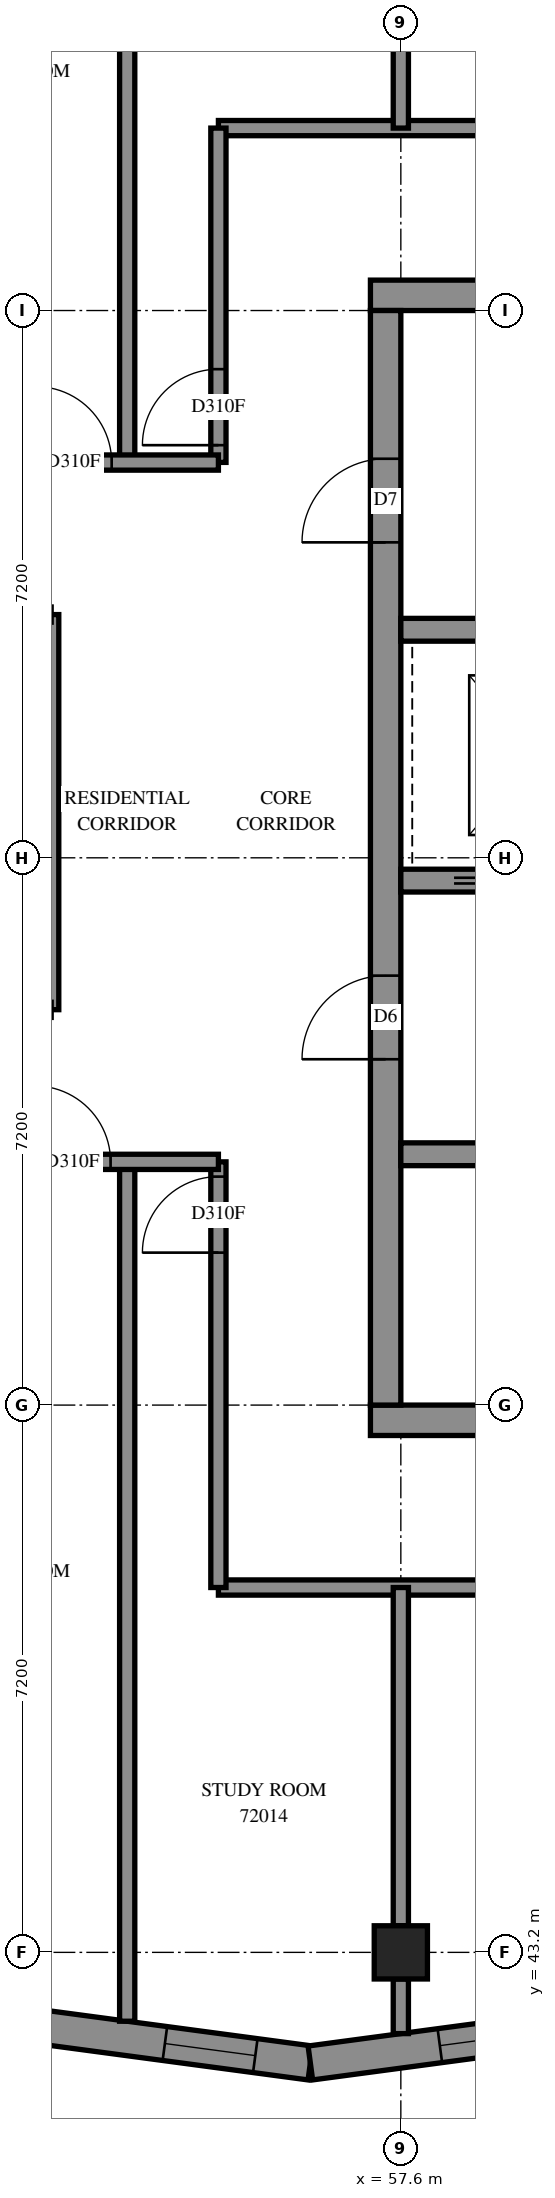
"""IFC4 building model, lengths in metres.
Left out: names, types, materials, properties, quantities, classifications, styles, units other than length and angle.
Written with IfcOpenShell. Run it as: python <this file> out.ifc"""

import sys

from ifc_helpers import new_model, si_unit, direction, frame, frame_2d, origin, origin_2d, place, context, subcontext, project, spatial, polyline, rectangle, outline, extrude, element, fill, save


model = new_model("IFC4")
c1 = context("Model", 3, precision=1e-05, world=origin(), true_north=direction((0.0, 1.0)))
c2 = subcontext(c1, "Body", "Model", "MODEL_VIEW")
j1 = project(units=[si_unit("LENGTHUNIT", "METRE"), si_unit("PLANEANGLEUNIT", "RADIAN")], contexts=[c1])
p1 = place(None, origin())
s1 = spatial("IfcSite", under=j1, at=p1, CompositionType="ELEMENT")
p2 = place(p1, origin())
s2 = spatial("IfcBuilding", under=s1, at=p2, CompositionType="ELEMENT")
p3 = place(p2, frame((0.0, 0.0, 264.2)))
s3 = spatial("IfcBuildingStorey", under=s2, at=p3, CompositionType="ELEMENT", Elevation=264.2)
p4 = place(p3, frame((57.6, 43.2, 0.0), z_axis=(0.0, 0.0, 1.0), x_axis=(1.0, 0.0, 0.0)))
e1 = element("IfcColumn", 1, at=p4, inside=s3, PredefinedType="COLUMN", context=c2, shape_type="SweptSolid", body=[
    extrude(rectangle(XDim=0.7, YDim=0.7, at=origin_2d()), origin(), (0.0, 0.0, 1.0), 3.1),
])
p5 = place(p3, frame((57.2, 50.2, -0.3), z_axis=(0.0, 0.0, 1.0), x_axis=(1.0, 0.0, 0.0)))
e2 = element("IfcWall", 2, at=p5, inside=s3, PredefinedType="SHEAR", context=c2, shape_type="SweptSolid", body=[
    extrude(rectangle(XDim=15.2, YDim=0.4, at=frame_2d((7.6, 0.0))), origin(), (0.0, 0.0, 1.0), 2.7),
])
p6 = place(p3, frame((57.2, 65.0, -0.3), z_axis=(0.0, 0.0, 1.0), x_axis=(1.0, 0.0, 0.0)))
e3 = element("IfcWall", 3, at=p6, inside=s3, PredefinedType="SHEAR", context=c2, shape_type="SweptSolid", body=[
    extrude(rectangle(XDim=15.2, YDim=0.4, at=frame_2d((7.6, 0.0))), origin(), (0.0, 0.0, 1.0), 2.7),
])
p7 = place(p6, frame((10.4, 0.0, 0.3)))
e4 = element("IfcOpeningElement", 4, at=p7, cuts=e3, PredefinedType="OPENING", context=c2, shape_type="SweptSolid", body=[
    extrude(rectangle(XDim=0.8, YDim=2.1, at=frame_2d((0.4, 1.05))), frame((0.0, 0.21, 0.0), z_axis=(0.0, -1.0, 0.0), x_axis=(1.0, 0.0, 0.0)), (0.0, 0.0, 1.0), 0.42),
])
p8 = place(p3, frame((57.4, 50.4, -0.3), z_axis=(0.0, 0.0, 1.0), x_axis=(0.0, 1.0, 0.0)))
e5 = element("IfcWall", 5, at=p8, inside=s3, PredefinedType="SHEAR", context=c2, shape_type="SweptSolid", body=[
    extrude(rectangle(XDim=14.4, YDim=0.4, at=frame_2d((7.2, 0.0))), origin(), (0.0, 0.0, 1.0), 2.7),
])
p9 = place(p8, frame((4.55, 0.0, 0.3)))
e6 = element("IfcOpeningElement", 6, at=p9, cuts=e5, PredefinedType="OPENING", context=c2, shape_type="SweptSolid", body=[
    extrude(rectangle(XDim=1.1, YDim=2.1, at=frame_2d((0.55, 1.05))), frame((0.0, 0.21, 0.0), z_axis=(0.0, -1.0, 0.0), x_axis=(1.0, 0.0, 0.0)), (0.0, 0.0, 1.0), 0.42),
])
p10 = place(p8, frame((11.35, 0.0, 0.3)))
e7 = element("IfcOpeningElement", 7, at=p10, cuts=e5, PredefinedType="OPENING", context=c2, shape_type="SweptSolid", body=[
    extrude(rectangle(XDim=1.1, YDim=2.1, at=frame_2d((0.55, 1.05))), frame((0.0, 0.21, 0.0), z_axis=(0.0, -1.0, 0.0), x_axis=(1.0, 0.0, 0.0)), (0.0, 0.0, 1.0), 0.42),
])
p11 = place(p3, frame((57.6, 53.7, 0.0), z_axis=(0.0, 0.0, 1.0), x_axis=(1.0, 0.0, 0.0)))
e8 = element("IfcWall", 8, at=p11, inside=s3, PredefinedType="SOLIDWALL", context=c2, shape_type="SweptSolid", body=[
    extrude(rectangle(XDim=14.4, YDim=0.3, at=frame_2d((7.2, 0.0))), origin(), (0.0, 0.0, 1.0), 3.1),
])
p12 = place(p11, frame((1.35, 0.0, 0.0)))
e9 = element("IfcOpeningElement", 9, at=p12, cuts=e8, PredefinedType="OPENING", context=c2, shape_type="SweptSolid", body=[
    extrude(rectangle(XDim=0.9, YDim=2.1, at=frame_2d((0.45, 1.05))), frame((0.0, 0.16, 0.0), z_axis=(0.0, -1.0, 0.0), x_axis=(1.0, 0.0, 0.0)), (0.0, 0.0, 1.0), 0.32),
])
p13 = place(p11, frame((4.95, 0.0, 0.0)))
e10 = element("IfcOpeningElement", 10, at=p13, cuts=e8, PredefinedType="OPENING", context=c2, shape_type="SweptSolid", body=[
    extrude(rectangle(XDim=0.9, YDim=2.1, at=frame_2d((0.45, 1.05))), frame((0.0, 0.16, 0.0), z_axis=(0.0, -1.0, 0.0), x_axis=(1.0, 0.0, 0.0)), (0.0, 0.0, 1.0), 0.32),
])
p14 = place(p11, frame((8.55, 0.0, 0.0)))
e11 = element("IfcOpeningElement", 11, at=p14, cuts=e8, PredefinedType="OPENING", context=c2, shape_type="SweptSolid", body=[
    extrude(rectangle(XDim=0.9, YDim=2.1, at=frame_2d((0.45, 1.05))), frame((0.0, 0.16, 0.0), z_axis=(0.0, -1.0, 0.0), x_axis=(1.0, 0.0, 0.0)), (0.0, 0.0, 1.0), 0.32),
])
p15 = place(p11, frame((12.05, 0.0, 0.0)))
e12 = element("IfcOpeningElement", 12, at=p15, cuts=e8, PredefinedType="OPENING", context=c2, shape_type="SweptSolid", body=[
    extrude(rectangle(XDim=1.1, YDim=2.1, at=frame_2d((0.55, 1.05))), frame((0.0, 0.16, 0.0), z_axis=(0.0, -1.0, 0.0), x_axis=(1.0, 0.0, 0.0)), (0.0, 0.0, 1.0), 0.32),
])
p16 = place(p3, frame((57.6, 57.3, 0.0), z_axis=(0.0, 0.0, 1.0), x_axis=(1.0, 0.0, 0.0)))
e13 = element("IfcWall", 13, at=p16, inside=s3, PredefinedType="SOLIDWALL", context=c2, shape_type="SweptSolid", body=[
    extrude(rectangle(XDim=14.4, YDim=0.3, at=frame_2d((7.2, 0.0))), origin(), (0.0, 0.0, 1.0), 3.1),
])
p17 = place(p16, frame((8.55, 0.0, 0.0)))
e14 = element("IfcOpeningElement", 14, at=p17, cuts=e13, PredefinedType="OPENING", context=c2, shape_type="SweptSolid", body=[
    extrude(rectangle(XDim=0.9, YDim=2.1, at=frame_2d((0.45, 1.05))), frame((0.0, 0.16, 0.0), z_axis=(0.0, -1.0, 0.0), x_axis=(1.0, 0.0, 0.0)), (0.0, 0.0, 1.0), 0.32),
])
p18 = place(p16, frame((1.25, 0.0, 0.0)))
e15 = element("IfcOpeningElement", 15, at=p18, cuts=e13, PredefinedType="OPENING", context=c2, shape_type="SweptSolid", body=[
    extrude(rectangle(XDim=1.1, YDim=2.1, at=frame_2d((0.55, 1.05))), frame((0.0, 0.16, 0.0), z_axis=(0.0, -1.0, 0.0), x_axis=(1.0, 0.0, 0.0)), (0.0, 0.0, 1.0), 0.32),
])
p19 = place(p16, frame((4.85, 0.0, 0.0)))
e16 = element("IfcOpeningElement", 16, at=p19, cuts=e13, PredefinedType="OPENING", context=c2, shape_type="SweptSolid", body=[
    extrude(rectangle(XDim=1.1, YDim=2.1, at=frame_2d((0.55, 1.05))), frame((0.0, 0.16, 0.0), z_axis=(0.0, -1.0, 0.0), x_axis=(1.0, 0.0, 0.0)), (0.0, 0.0, 1.0), 0.32),
])
p20 = place(p16, frame((12.05, 0.0, 0.0)))
e17 = element("IfcOpeningElement", 17, at=p20, cuts=e13, PredefinedType="OPENING", context=c2, shape_type="SweptSolid", body=[
    extrude(rectangle(XDim=1.1, YDim=2.1, at=frame_2d((0.55, 1.05))), frame((0.0, 0.16, 0.0), z_axis=(0.0, -1.0, 0.0), x_axis=(1.0, 0.0, 0.0)), (0.0, 0.0, 1.0), 0.32),
])
p21 = place(p3, frame((57.6, 60.6, 0.0), z_axis=(0.0, 0.0, 1.0), x_axis=(1.0, 0.0, 0.0)))
e18 = element("IfcWall", 18, at=p21, inside=s3, PredefinedType="SOLIDWALL", context=c2, shape_type="SweptSolid", body=[
    extrude(rectangle(XDim=7.2, YDim=0.3, at=frame_2d((3.6, 0.0))), origin(), (0.0, 0.0, 1.0), 3.1),
])
p22 = place(p3, frame((52.786, 42.229, 0.0), z_axis=(0.0, 0.0, 1.0), x_axis=(0.991180049, -0.1325221131, 0.0)))
e19 = element("IfcWall", 19, at=p22, inside=s3, PredefinedType="SOLIDWALL", context=c2, shape_type="SweptSolid", body=[
    extrude(outline(polyline([(0.049, -0.225), (3.685, -0.225), (3.625, 0.225), (-0.049, 0.225), (0.049, -0.225)])), origin(), (0.0, 0.0, 1.0), 3.1),
])
p23 = place(p22, frame((1.725, 0.0, 0.45)))
e20 = element("IfcOpeningElement", 20, at=p23, cuts=e19, PredefinedType="OPENING", context=c2, shape_type="SweptSolid", body=[
    extrude(rectangle(XDim=1.2, YDim=2.55, at=frame_2d((0.6, 1.275))), frame((0.0, 0.235, 0.0), z_axis=(0.0, -1.0, 0.0), x_axis=(1.0, 0.0, 0.0)), (0.0, 0.0, 1.0), 0.47),
])
p24 = place(p3, frame((56.41, 41.745, 0.0), z_axis=(0.0, 0.0, 1.0), x_axis=(0.991178361, 0.132534738, 0.0)))
e21 = element("IfcWall", 21, at=p24, inside=s3, PredefinedType="SOLIDWALL", context=c2, shape_type="SweptSolid", body=[
    extrude(outline(polyline([(-0.03, -0.225), (3.607, -0.225), (3.667, 0.225), (0.03, 0.225), (-0.03, -0.225)])), origin(), (0.0, 0.0, 1.0), 3.1),
])
p25 = place(p24, frame((1.719, 0.0, 0.45)))
e22 = element("IfcOpeningElement", 22, at=p25, cuts=e21, PredefinedType="OPENING", context=c2, shape_type="SweptSolid", body=[
    extrude(rectangle(XDim=1.2, YDim=2.55, at=frame_2d((0.6, 1.275))), frame((0.0, 0.235, 0.0), z_axis=(0.0, -1.0, 0.0), x_axis=(1.0, 0.0, 0.0)), (0.0, 0.0, 1.0), 0.47),
])
p26 = place(p3, frame((55.2, 67.2, 0.0), z_axis=(0.0, 0.0, 1.0), x_axis=(1.0, 0.0, 0.0)))
e23 = element("IfcWall", 23, at=p26, inside=s3, PredefinedType="PARTITIONING", context=c2, shape_type="SweptSolid", body=[
    extrude(rectangle(XDim=19.2, YDim=0.2, at=frame_2d((9.6, 0.0))), origin(), (0.0, 0.0, 1.0), 3.1),
])
p27 = place(p26, frame((4.492, 0.0, 0.0)))
e24 = element("IfcOpeningElement", 24, at=p27, cuts=e23, PredefinedType="OPENING", context=c2, shape_type="SweptSolid", body=[
    extrude(rectangle(XDim=1.0, YDim=2.1, at=frame_2d((0.5, 1.05))), frame((0.0, 0.11, 0.0), z_axis=(0.0, -1.0, 0.0), x_axis=(1.0, 0.0, 0.0)), (0.0, 0.0, 1.0), 0.22),
])
p28 = place(p26, frame((6.567, 0.0, 0.0)))
e25 = element("IfcOpeningElement", 25, at=p28, cuts=e23, PredefinedType="OPENING", context=c2, shape_type="SweptSolid", body=[
    extrude(rectangle(XDim=1.0, YDim=2.1, at=frame_2d((0.5, 1.05))), frame((0.0, 0.11, 0.0), z_axis=(0.0, -1.0, 0.0), x_axis=(1.0, 0.0, 0.0)), (0.0, 0.0, 1.0), 0.22),
])
p29 = place(p26, frame((11.693, 0.0, 0.0)))
e26 = element("IfcOpeningElement", 26, at=p29, cuts=e23, PredefinedType="OPENING", context=c2, shape_type="SweptSolid", body=[
    extrude(rectangle(XDim=1.0, YDim=2.1, at=frame_2d((0.5, 1.05))), frame((0.0, 0.11, 0.0), z_axis=(0.0, -1.0, 0.0), x_axis=(1.0, 0.0, 0.0)), (0.0, 0.0, 1.0), 0.22),
])
p30 = place(p26, frame((13.88, 0.0, 0.0)))
e27 = element("IfcOpeningElement", 27, at=p30, cuts=e23, PredefinedType="OPENING", context=c2, shape_type="SweptSolid", body=[
    extrude(rectangle(XDim=1.0, YDim=2.1, at=frame_2d((0.5, 1.05))), frame((0.0, 0.11, 0.0), z_axis=(0.0, -1.0, 0.0), x_axis=(1.0, 0.0, 0.0)), (0.0, 0.0, 1.0), 0.22),
])
p31 = place(p3, frame((55.2, 48.0, 0.0), z_axis=(0.0, 0.0, 1.0), x_axis=(1.0, 0.0, 0.0)))
e28 = element("IfcWall", 28, at=p31, inside=s3, PredefinedType="PARTITIONING", context=c2, shape_type="SweptSolid", body=[
    extrude(rectangle(XDim=19.15, YDim=0.2, at=frame_2d((9.575, 0.0))), origin(), (0.0, 0.0, 1.0), 3.1),
])
p32 = place(p31, frame((4.475, 0.0, 0.0)))
e29 = element("IfcOpeningElement", 29, at=p32, cuts=e28, PredefinedType="OPENING", context=c2, shape_type="SweptSolid", body=[
    extrude(rectangle(XDim=1.0, YDim=2.1, at=frame_2d((0.5, 1.05))), frame((0.0, 0.11, 0.0), z_axis=(0.0, -1.0, 0.0), x_axis=(1.0, 0.0, 0.0)), (0.0, 0.0, 1.0), 0.22),
])
p33 = place(p31, frame((8.338, 0.0, 0.0)))
e30 = element("IfcOpeningElement", 30, at=p33, cuts=e28, PredefinedType="OPENING", context=c2, shape_type="SweptSolid", body=[
    extrude(rectangle(XDim=1.0, YDim=2.1, at=frame_2d((0.5, 1.05))), frame((0.0, 0.11, 0.0), z_axis=(0.0, -1.0, 0.0), x_axis=(1.0, 0.0, 0.0)), (0.0, 0.0, 1.0), 0.22),
])
p34 = place(p31, frame((13.707, 0.0, 0.0)))
e31 = element("IfcOpeningElement", 31, at=p34, cuts=e28, PredefinedType="OPENING", context=c2, shape_type="SweptSolid", body=[
    extrude(rectangle(XDim=1.0, YDim=2.1, at=frame_2d((0.5, 1.05))), frame((0.0, 0.11, 0.0), z_axis=(0.0, -1.0, 0.0), x_axis=(1.0, 0.0, 0.0)), (0.0, 0.0, 1.0), 0.22),
])
p35 = place(p3, frame((54.0, 42.294, 0.0), z_axis=(0.0, 0.0, 1.0), x_axis=(0.0, 1.0, 0.0)))
e32 = element("IfcWall", 32, at=p35, inside=s3, PredefinedType="PARTITIONING", context=c2, shape_type="SweptSolid", body=[
    extrude(rectangle(XDim=11.306, YDim=0.2, at=frame_2d((5.653, 0.0))), origin(), (0.0, 0.0, 1.0), 3.1),
])
p36 = place(p3, frame((54.0, 62.8, 0.0), z_axis=(0.0, 0.0, 1.0), x_axis=(0.0, 1.0, 0.0)))
e33 = element("IfcWall", 33, at=p36, inside=s3, PredefinedType="PARTITIONING", context=c2, shape_type="SweptSolid", body=[
    extrude(rectangle(XDim=10.031, YDim=0.2, at=frame_2d((5.015, 0.0))), origin(), (0.0, 0.0, 1.0), 3.1),
])
p37 = place(p3, frame((55.2, 48.0, 0.0), z_axis=(0.0, 0.0, 1.0), x_axis=(0.0, 1.0, 0.0)))
e34 = element("IfcWall", 34, at=p37, inside=s3, PredefinedType="PARTITIONING", context=c2, shape_type="SweptSolid", body=[
    extrude(rectangle(XDim=5.6, YDim=0.2, at=frame_2d((2.8, 0.0))), origin(), (0.0, 0.0, 1.0), 3.1),
])
p38 = place(p37, frame((4.406, 0.0, 0.0)))
e35 = element("IfcOpeningElement", 35, at=p38, cuts=e34, PredefinedType="OPENING", context=c2, shape_type="SweptSolid", body=[
    extrude(rectangle(XDim=1.0, YDim=2.1, at=frame_2d((0.5, 1.05))), frame((0.0, 0.11, 0.0), z_axis=(0.0, -1.0, 0.0), x_axis=(1.0, 0.0, 0.0)), (0.0, 0.0, 1.0), 0.22),
])
p39 = place(p3, frame((53.0, 55.602, 0.0), z_axis=(0.0, 0.0, 1.0), x_axis=(0.0, 1.0, 0.0)))
e36 = element("IfcWall", 36, at=p39, inside=s3, PredefinedType="PARTITIONING", context=c2, shape_type="SweptSolid", body=[
    extrude(rectangle(XDim=5.198, YDim=0.2, at=frame_2d((2.599, 0.0))), origin(), (0.0, 0.0, 1.0), 3.1),
])
for number, where, z_axis, x_axis in (
    (37, (57.6, 43.55, 0.0), (0.0, 0.0, 1.0), (0.0, 1.0, 0.0)),
    (38, (57.6, 67.2, 0.0), (0.0, 0.0, 1.0), (0.0, 1.0, 0.0)),
):
    element("IfcWall", number, at=place(p3, frame(where, z_axis=z_axis, x_axis=x_axis)), inside=s3, PredefinedType="PARTITIONING", context=c2, shape_type="SweptSolid", body=[
        extrude(rectangle(XDim=4.45, YDim=0.2, at=frame_2d((2.225, 0.0))), origin(), (0.0, 0.0, 1.0), 3.1),
    ])
p40 = place(p3, frame((55.2, 62.802, 0.0), z_axis=(0.0, 0.0, 1.0), x_axis=(0.0, 1.0, 0.0)))
e39 = element("IfcWall", 39, at=p40, inside=s3, PredefinedType="PARTITIONING", context=c2, shape_type="SweptSolid", body=[
    extrude(rectangle(XDim=4.398, YDim=0.2, at=frame_2d((2.199, 0.0))), origin(), (0.0, 0.0, 1.0), 3.1),
])
p41 = place(p40, frame((0.227, 0.0, 0.0)))
e40 = element("IfcOpeningElement", 40, at=p41, cuts=e39, PredefinedType="OPENING", context=c2, shape_type="SweptSolid", body=[
    extrude(rectangle(XDim=1.0, YDim=2.1, at=frame_2d((0.5, 1.05))), frame((0.0, 0.11, 0.0), z_axis=(0.0, -1.0, 0.0), x_axis=(1.0, 0.0, 0.0)), (0.0, 0.0, 1.0), 0.22),
])
p42 = place(p3, frame((50.85, 53.6, 0.0), z_axis=(0.0, 0.0, 1.0), x_axis=(1.0, 0.0, 0.0)))
e41 = element("IfcWall", 41, at=p42, inside=s3, PredefinedType="PARTITIONING", context=c2, shape_type="SweptSolid", body=[
    extrude(rectangle(XDim=4.35, YDim=0.2, at=frame_2d((2.175, 0.0))), origin(), (0.0, 0.0, 1.0), 3.1),
])
p43 = place(p42, frame((1.931, 0.0, 0.0)))
e42 = element("IfcOpeningElement", 42, at=p43, cuts=e41, PredefinedType="OPENING", context=c2, shape_type="SweptSolid", body=[
    extrude(rectangle(XDim=1.0, YDim=2.1, at=frame_2d((0.5, 1.05))), frame((0.0, 0.11, 0.0), z_axis=(0.0, -1.0, 0.0), x_axis=(1.0, 0.0, 0.0)), (0.0, 0.0, 1.0), 0.22),
])
p44 = place(p3, frame((50.85, 62.8, 0.0), z_axis=(0.0, 0.0, 1.0), x_axis=(1.0, 0.0, 0.0)))
e43 = element("IfcWall", 43, at=p44, inside=s3, PredefinedType="PARTITIONING", context=c2, shape_type="SweptSolid", body=[
    extrude(rectangle(XDim=4.35, YDim=0.2, at=frame_2d((2.175, 0.0))), origin(), (0.0, 0.0, 1.0), 3.1),
])
p45 = place(p44, frame((1.946, 0.0, 0.0)))
e44 = element("IfcOpeningElement", 44, at=p45, cuts=e43, PredefinedType="OPENING", context=c2, shape_type="SweptSolid", body=[
    extrude(rectangle(XDim=1.0, YDim=2.1, at=frame_2d((0.5, 1.05))), frame((0.0, 0.11, 0.0), z_axis=(0.0, -1.0, 0.0), x_axis=(1.0, 0.0, 0.0)), (0.0, 0.0, 1.0), 0.22),
])
p46 = place(p3, frame((57.6, 42.131, 0.0), z_axis=(0.0, 0.0, 1.0), x_axis=(0.0, 1.0, 0.0)))
e45 = element("IfcWall", 45, at=p46, inside=s3, PredefinedType="PARTITIONING", context=c2, shape_type="SweptSolid", body=[
    extrude(rectangle(XDim=0.719, YDim=0.2, at=frame_2d((0.359, 0.0))), origin(), (0.0, 0.0, 1.0), 3.1),
])
p47 = place(p23, origin())
e46 = element("IfcWindow", 46, at=p47, inside=s3, PartitioningType="SINGLE_PANEL", PredefinedType="WINDOW", context=c2, shape_type="SweptSolid", body=[
    extrude(rectangle(XDim=1.2, YDim=2.55, at=frame_2d((0.6, 1.275))), frame((0.0, 0.205, 0.0), z_axis=(0.0, -1.0, 0.0), x_axis=(1.0, 0.0, 0.0)), (0.0, 0.0, 1.0), 0.06),
])
fill(e20, e46)
p48 = place(p25, origin())
e47 = element("IfcWindow", 47, at=p48, inside=s3, PartitioningType="SINGLE_PANEL", PredefinedType="WINDOW", context=c2, shape_type="SweptSolid", body=[
    extrude(rectangle(XDim=1.2, YDim=2.55, at=frame_2d((0.6, 1.275))), frame((0.0, 0.205, 0.0), z_axis=(0.0, -1.0, 0.0), x_axis=(1.0, 0.0, 0.0)), (0.0, 0.0, 1.0), 0.06),
])
fill(e22, e47)
p49 = place(p9, origin())
e48 = element("IfcDoor", 48, at=p49, inside=s3, OperationType="DOUBLE_DOOR_SINGLE_SWING", PredefinedType="DOOR", context=c2, shape_type="SweptSolid", body=[
    extrude(rectangle(XDim=1.1, YDim=2.1, at=frame_2d((0.55, 1.05))), frame((0.0, 0.025, 0.0), z_axis=(0.0, -1.0, 0.0), x_axis=(1.0, 0.0, 0.0)), (0.0, 0.0, 1.0), 0.05),
])
fill(e6, e48)
p50 = place(p10, origin())
e49 = element("IfcDoor", 49, at=p50, inside=s3, OperationType="SINGLE_SWING_LEFT", PredefinedType="DOOR", context=c2, shape_type="SweptSolid", body=[
    extrude(rectangle(XDim=1.1, YDim=2.1, at=frame_2d((0.55, 1.05))), frame((0.0, 0.025, 0.0), z_axis=(0.0, -1.0, 0.0), x_axis=(1.0, 0.0, 0.0)), (0.0, 0.0, 1.0), 0.05),
])
fill(e7, e49)
p51 = place(p43, origin())
e50 = element("IfcDoor", 50, at=p51, inside=s3, OperationType="SINGLE_SWING_LEFT", PredefinedType="DOOR", context=c2, shape_type="SweptSolid", body=[
    extrude(rectangle(XDim=1.0, YDim=2.1, at=frame_2d((0.5, 1.05))), frame((0.0, 0.025, 0.0), z_axis=(0.0, -1.0, 0.0), x_axis=(1.0, 0.0, 0.0)), (0.0, 0.0, 1.0), 0.05),
])
fill(e42, e50)
p52 = place(p38, origin())
e51 = element("IfcDoor", 51, at=p52, inside=s3, OperationType="SINGLE_SWING_RIGHT", PredefinedType="DOOR", context=c2, shape_type="SweptSolid", body=[
    extrude(rectangle(XDim=1.0, YDim=2.1, at=frame_2d((0.5, 1.05))), frame((0.0, 0.025, 0.0), z_axis=(0.0, -1.0, 0.0), x_axis=(1.0, 0.0, 0.0)), (0.0, 0.0, 1.0), 0.05),
])
fill(e35, e51)
p53 = place(p45, origin())
e52 = element("IfcDoor", 52, at=p53, inside=s3, OperationType="SINGLE_SWING_RIGHT", PredefinedType="DOOR", context=c2, shape_type="SweptSolid", body=[
    extrude(rectangle(XDim=1.0, YDim=2.1, at=frame_2d((0.5, 1.05))), frame((0.0, 0.025, 0.0), z_axis=(0.0, -1.0, 0.0), x_axis=(1.0, 0.0, 0.0)), (0.0, 0.0, 1.0), 0.05),
])
fill(e44, e52)
p54 = place(p41, origin())
e53 = element("IfcDoor", 53, at=p54, inside=s3, OperationType="SINGLE_SWING_LEFT", PredefinedType="DOOR", context=c2, shape_type="SweptSolid", body=[
    extrude(rectangle(XDim=1.0, YDim=2.1, at=frame_2d((0.5, 1.05))), frame((0.0, 0.025, 0.0), z_axis=(0.0, -1.0, 0.0), x_axis=(1.0, 0.0, 0.0)), (0.0, 0.0, 1.0), 0.05),
])
fill(e40, e53)
save(model, sys.argv[1])
